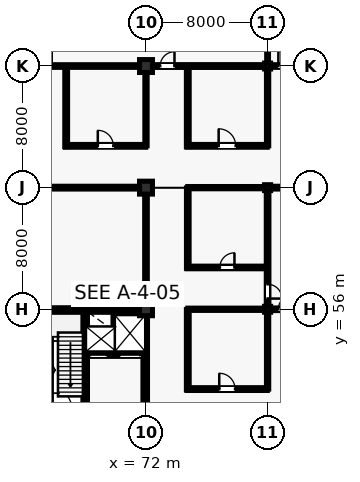
"""IFC4 building model, lengths in metres.
Left out: names, types, materials, properties, quantities, classifications, styles, units other than length and angle.
Written with IfcOpenShell. Run it as: python <this file> out.ifc"""

import sys

from ifc_helpers import new_model, si_unit, direction, frame, frame_2d, origin, origin_2d, place, context, subcontext, project, spatial, rectangle, i_section, extrude, element, fill, save


model = new_model("IFC4")
c1 = context("Model", 3, precision=1e-05, world=origin(), true_north=direction((0.0, 1.0)))
c2 = subcontext(c1, "Body", "Model", "MODEL_VIEW")
j1 = project(units=[si_unit("LENGTHUNIT", "METRE"), si_unit("PLANEANGLEUNIT", "RADIAN")], contexts=[c1])
p1 = place(None, origin())
s1 = spatial("IfcSite", under=j1, at=p1, CompositionType="ELEMENT")
p2 = place(p1, origin())
s2 = spatial("IfcBuilding", under=s1, at=p2, CompositionType="ELEMENT")
p3 = place(p2, origin())
s3 = spatial("IfcBuildingStorey", under=s2, at=p3, CompositionType="ELEMENT", Elevation=0.0)
for number, where, z_axis, x_axis in (
    (1, (72.0, 56.0, 0.0), (0.0, 0.0, 1.0), (1.0, 0.0, 0.0)),
    (2, (72.0, 64.0, 0.0), (0.0, 0.0, 1.0), (1.0, 0.0, 0.0)),
    (3, (72.0, 72.0, 0.0), (0.0, 0.0, 1.0), (1.0, 0.0, 0.0)),
):
    element("IfcColumn", number, at=place(p3, frame(where, z_axis=z_axis, x_axis=x_axis)), inside=s3, PredefinedType="COLUMN", context=c2, shape_type="SweptSolid", body=[
        extrude(rectangle(XDim=0.85, YDim=0.85, at=origin_2d()), origin(), (0.0, 0.0, 1.0), 5.28),
    ])
for number, where, z_axis, x_axis in (
    (4, (80.0, 56.0, 0.0), (0.0, 0.0, 1.0), (1.0, 0.0, 0.0)),
    (5, (80.0, 64.0, 0.0), (0.0, 0.0, 1.0), (1.0, 0.0, 0.0)),
    (6, (80.0, 72.0, 0.0), (0.0, 0.0, 1.0), (1.0, 0.0, 0.0)),
):
    element("IfcColumn", number, at=place(p3, frame(where, z_axis=z_axis, x_axis=x_axis)), inside=s3, PredefinedType="COLUMN", context=c2, shape_type="SweptSolid", body=[
        extrude(i_section(OverallWidth=0.398, OverallDepth=0.387, WebThickness=0.021, FlangeThickness=0.033, FilletRadius=0.015, at=origin_2d()), origin(), (0.0, 0.0, 1.0), 5.28),
    ])
p4 = place(p3, frame((64.29, 55.95, 0.0), z_axis=(0.0, 0.0, 1.0), x_axis=(1.0, 0.0, 0.0)))
e7 = element("IfcWall", 7, at=p4, inside=s3, PredefinedType="SHEAR", context=c2, shape_type="SweptSolid", body=[
    extrude(rectangle(XDim=7.395, YDim=0.3, at=frame_2d((3.698, 0.0))), origin(), (0.0, 0.0, 1.0), 5.035),
])
p5 = place(p3, frame((71.95, 48.315, 0.0), z_axis=(0.0, 0.0, 1.0), x_axis=(0.0, 1.0, 0.0)))
e8 = element("IfcWall", 8, at=p5, inside=s3, PredefinedType="SHEAR", context=c2, shape_type="SweptSolid", body=[
    extrude(rectangle(XDim=7.37, YDim=0.3, at=frame_2d((3.685, 0.0))), origin(), (0.0, 0.0, 1.0), 5.035),
])
p6 = place(p3, frame((68.0, 48.05, 0.0), z_axis=(0.0, 0.0, 1.0), x_axis=(0.0, 1.0, 0.0)))
e9 = element("IfcWall", 9, at=p6, inside=s3, PredefinedType="SHEAR", context=c2, shape_type="SweptSolid", body=[
    extrude(rectangle(XDim=7.9, YDim=0.3, at=frame_2d((3.95, 0.0))), origin(), (0.0, 0.0, 1.0), 5.035),
])
p7 = place(p6, frame((0.55, 0.0, 0.0)))
e10 = element("IfcOpeningElement", 10, at=p7, cuts=e9, PredefinedType="OPENING", context=c2, shape_type="SweptSolid", body=[
    extrude(rectangle(XDim=1.1, YDim=2.15, at=frame_2d((0.55, 1.075))), frame((0.0, 0.16, 0.0), z_axis=(0.0, -1.0, 0.0), x_axis=(1.0, 0.0, 0.0)), (0.0, 0.0, 1.0), 0.32),
])
p8 = place(p3, frame((68.0, 53.05, 0.0), z_axis=(0.0, 0.0, 1.0), x_axis=(1.0, 0.0, 0.0)))
e11 = element("IfcWall", 11, at=p8, inside=s3, PredefinedType="SHEAR", context=c2, shape_type="SweptSolid", body=[
    extrude(rectangle(XDim=3.95, YDim=0.3, at=frame_2d((1.975, 0.0))), origin(), (0.0, 0.0, 1.0), 5.035),
])
p9 = place(p8, frame((0.32, 0.0, 0.0)))
e12 = element("IfcOpeningElement", 12, at=p9, cuts=e11, PredefinedType="OPENING", context=c2, shape_type="SweptSolid", body=[
    extrude(rectangle(XDim=1.1, YDim=2.2, at=frame_2d((0.55, 1.1))), frame((0.0, 0.16, 0.0), z_axis=(0.0, -1.0, 0.0), x_axis=(1.0, 0.0, 0.0)), (0.0, 0.0, 1.0), 0.32),
])
p10 = place(p8, frame((2.28, 0.0, 0.0)))
e13 = element("IfcOpeningElement", 13, at=p10, cuts=e11, PredefinedType="OPENING", context=c2, shape_type="SweptSolid", body=[
    extrude(rectangle(XDim=1.35, YDim=2.3, at=frame_2d((0.675, 1.15))), frame((0.0, 0.16, 0.0), z_axis=(0.0, -1.0, 0.0), x_axis=(1.0, 0.0, 0.0)), (0.0, 0.0, 1.0), 0.32),
])
p11 = place(p3, frame((69.98, 53.05, 0.0), z_axis=(0.0, 0.0, 1.0), x_axis=(0.0, 1.0, 0.0)))
e14 = element("IfcWall", 14, at=p11, inside=s3, PredefinedType="SHEAR", context=c2, shape_type="SweptSolid", body=[
    extrude(rectangle(XDim=2.9, YDim=0.3, at=frame_2d((1.45, 0.0))), origin(), (0.0, 0.0, 1.0), 5.035),
])
p12 = place(p3, frame((66.7, 66.75, 0.0), z_axis=(0.0, 0.0, 1.0), x_axis=(1.0, 0.0, 0.0)))
e15 = element("IfcWall", 15, at=p12, inside=s3, PredefinedType="PARTITIONING", context=c2, shape_type="SweptSolid", body=[
    extrude(rectangle(XDim=5.28, YDim=0.185, at=frame_2d((2.64, 0.0))), origin(), (0.0, 0.0, 1.0), 4.412),
])
p13 = place(p12, frame((2.13, 0.0, 0.0)))
e16 = element("IfcOpeningElement", 16, at=p13, cuts=e15, PredefinedType="OPENING", context=c2, shape_type="SweptSolid", body=[
    extrude(rectangle(XDim=1.02, YDim=2.2, at=frame_2d((0.51, 1.1))), frame((0.0, 0.103, 0.0), z_axis=(0.0, -1.0, 0.0), x_axis=(1.0, 0.0, 0.0)), (0.0, 0.0, 1.0), 0.205),
])
p14 = place(p3, frame((66.75, 66.7, 0.0), z_axis=(0.0, 0.0, 1.0), x_axis=(0.0, 1.0, 0.0)))
e17 = element("IfcWall", 17, at=p14, inside=s3, PredefinedType="PARTITIONING", context=c2, shape_type="SweptSolid", body=[
    extrude(rectangle(XDim=5.28, YDim=0.185, at=frame_2d((2.64, 0.0))), origin(), (0.0, 0.0, 1.0), 4.403),
])
p15 = place(p3, frame((72.0, 66.75, 0.0), z_axis=(0.0, 0.0, 1.0), x_axis=(0.0, 1.0, 0.0)))
e18 = element("IfcWall", 18, at=p15, inside=s3, PredefinedType="PARTITIONING", context=c2, shape_type="SweptSolid", body=[
    extrude(rectangle(XDim=4.815, YDim=0.15, at=frame_2d((2.407, 0.0))), origin(), (0.0, 0.0, 1.0), 4.412),
])
p16 = place(p3, frame((74.7, 50.75, 0.0), z_axis=(0.0, 0.0, 1.0), x_axis=(1.0, 0.0, 0.0)))
e19 = element("IfcWall", 19, at=p16, inside=s3, PredefinedType="PARTITIONING", context=c2, shape_type="SweptSolid", body=[
    extrude(rectangle(XDim=5.28, YDim=0.185, at=frame_2d((2.64, 0.0))), origin(), (0.0, 0.0, 1.0), 4.403),
])
p17 = place(p16, frame((2.12, 0.0, 0.0)))
e20 = element("IfcOpeningElement", 20, at=p17, cuts=e19, PredefinedType="OPENING", context=c2, shape_type="SweptSolid", body=[
    extrude(rectangle(XDim=1.04, YDim=2.18, at=frame_2d((0.52, 1.09))), frame((0.0, 0.103, 0.0), z_axis=(0.0, -1.0, 0.0), x_axis=(1.0, 0.0, 0.0)), (0.0, 0.0, 1.0), 0.205),
])
p18 = place(p3, frame((74.75, 50.7, 0.0), z_axis=(0.0, 0.0, 1.0), x_axis=(0.0, 1.0, 0.0)))
e21 = element("IfcWall", 21, at=p18, inside=s3, PredefinedType="PARTITIONING", context=c2, shape_type="SweptSolid", body=[
    extrude(rectangle(XDim=5.28, YDim=0.185, at=frame_2d((2.64, 0.0))), origin(), (0.0, 0.0, 1.0), 4.327),
])
p19 = place(p3, frame((74.75, 56.0, 0.0), z_axis=(0.0, 0.0, 1.0), x_axis=(1.0, 0.0, 0.0)))
e22 = element("IfcWall", 22, at=p19, inside=s3, PredefinedType="PARTITIONING", context=c2, shape_type="SweptSolid", body=[
    extrude(rectangle(XDim=5.041, YDim=0.15, at=frame_2d((2.521, 0.0))), origin(), (0.0, 0.0, 1.0), 4.327),
])
p20 = place(p3, frame((80.0, 50.75, 0.0), z_axis=(0.0, 0.0, 1.0), x_axis=(0.0, 1.0, 0.0)))
e23 = element("IfcWall", 23, at=p20, inside=s3, PredefinedType="PARTITIONING", context=c2, shape_type="SweptSolid", body=[
    extrude(rectangle(XDim=5.046, YDim=0.15, at=frame_2d((2.523, 0.0))), origin(), (0.0, 0.0, 1.0), 4.403),
])
p21 = place(p3, frame((74.7, 58.75, 0.0), z_axis=(0.0, 0.0, 1.0), x_axis=(1.0, 0.0, 0.0)))
e24 = element("IfcWall", 24, at=p21, inside=s3, PredefinedType="PARTITIONING", context=c2, shape_type="SweptSolid", body=[
    extrude(rectangle(XDim=5.28, YDim=0.175, at=frame_2d((2.64, 0.0))), origin(), (0.0, 0.0, 1.0), 4.412),
])
p22 = place(p21, frame((2.16, 0.0, 0.0)))
e25 = element("IfcOpeningElement", 25, at=p22, cuts=e24, PredefinedType="OPENING", context=c2, shape_type="SweptSolid", body=[
    extrude(rectangle(XDim=0.96, YDim=2.14, at=frame_2d((0.48, 1.07))), frame((0.0, 0.097, 0.0), z_axis=(0.0, -1.0, 0.0), x_axis=(1.0, 0.0, 0.0)), (0.0, 0.0, 1.0), 0.195),
])
p23 = place(p3, frame((74.75, 58.7, 0.0), z_axis=(0.0, 0.0, 1.0), x_axis=(0.0, 1.0, 0.0)))
e26 = element("IfcWall", 26, at=p23, inside=s3, PredefinedType="PARTITIONING", context=c2, shape_type="SweptSolid", body=[
    extrude(rectangle(XDim=5.28, YDim=0.175, at=frame_2d((2.64, 0.0))), origin(), (0.0, 0.0, 1.0), 4.403),
])
p24 = place(p3, frame((74.75, 64.0, 0.0), z_axis=(0.0, 0.0, 1.0), x_axis=(1.0, 0.0, 0.0)))
e27 = element("IfcWall", 27, at=p24, inside=s3, PredefinedType="PARTITIONING", context=c2, shape_type="SweptSolid", body=[
    extrude(rectangle(XDim=5.041, YDim=0.15, at=frame_2d((2.521, 0.0))), origin(), (0.0, 0.0, 1.0), 4.403),
])
p25 = place(p3, frame((74.7, 66.75, 0.0), z_axis=(0.0, 0.0, 1.0), x_axis=(1.0, 0.0, 0.0)))
e28 = element("IfcWall", 28, at=p25, inside=s3, PredefinedType="PARTITIONING", context=c2, shape_type="SweptSolid", body=[
    extrude(rectangle(XDim=5.28, YDim=0.185, at=frame_2d((2.64, 0.0))), origin(), (0.0, 0.0, 1.0), 4.404),
])
p26 = place(p25, frame((2.08, 0.0, 0.0)))
e29 = element("IfcOpeningElement", 29, at=p26, cuts=e28, PredefinedType="OPENING", context=c2, shape_type="SweptSolid", body=[
    extrude(rectangle(XDim=1.12, YDim=2.22, at=frame_2d((0.56, 1.11))), frame((0.0, 0.103, 0.0), z_axis=(0.0, -1.0, 0.0), x_axis=(1.0, 0.0, 0.0)), (0.0, 0.0, 1.0), 0.205),
])
p27 = place(p3, frame((74.75, 66.7, 0.0), z_axis=(0.0, 0.0, 1.0), x_axis=(0.0, 1.0, 0.0)))
e30 = element("IfcWall", 30, at=p27, inside=s3, PredefinedType="PARTITIONING", context=c2, shape_type="SweptSolid", body=[
    extrude(rectangle(XDim=5.28, YDim=0.185, at=frame_2d((2.64, 0.0))), origin(), (0.0, 0.0, 1.0), 4.336),
])
p28 = place(p3, frame((80.0, 66.75, 0.0), z_axis=(0.0, 0.0, 1.0), x_axis=(0.0, 1.0, 0.0)))
e31 = element("IfcWall", 31, at=p28, inside=s3, PredefinedType="PARTITIONING", context=c2, shape_type="SweptSolid", body=[
    extrude(rectangle(XDim=5.046, YDim=0.15, at=frame_2d((2.523, 0.0))), origin(), (0.0, 0.0, 1.0), 4.404),
])
p29 = place(p3, frame((72.0, 56.415, 0.0), z_axis=(0.0, 0.0, 1.0), x_axis=(0.0, 1.0, 0.0)))
e32 = element("IfcWall", 32, at=p29, inside=s3, PredefinedType="PARTITIONING", context=c2, shape_type="SweptSolid", body=[
    extrude(rectangle(XDim=7.17, YDim=0.175, at=frame_2d((3.585, 0.0))), origin(), (0.0, 0.0, 1.0), 4.403),
])
p30 = place(p3, frame((64.34, 64.0, 0.0), z_axis=(0.0, 0.0, 1.0), x_axis=(1.0, 0.0, 0.0)))
e33 = element("IfcWall", 33, at=p30, inside=s3, PredefinedType="PARTITIONING", context=c2, shape_type="SweptSolid", body=[
    extrude(rectangle(XDim=7.245, YDim=0.185, at=frame_2d((3.623, 0.0))), origin(), (0.0, 0.0, 1.0), 4.327),
])
p31 = place(p3, frame((64.34, 72.0, 0.0), z_axis=(0.0, 0.0, 1.0), x_axis=(1.0, 0.0, 0.0)))
e34 = element("IfcWall", 34, at=p31, inside=s3, PredefinedType="PARTITIONING", context=c2, shape_type="SweptSolid", body=[
    extrude(rectangle(XDim=7.245, YDim=0.175, at=frame_2d((3.623, 0.0))), origin(), (0.0, 0.0, 1.0), 4.403),
])
p32 = place(p31, frame((0.52, 0.0, 0.0)))
e35 = element("IfcOpeningElement", 35, at=p32, cuts=e34, PredefinedType="OPENING", context=c2, shape_type="SweptSolid", body=[
    extrude(rectangle(XDim=0.94, YDim=2.12, at=frame_2d((0.47, 1.06))), frame((0.0, 0.097, 0.0), z_axis=(0.0, -1.0, 0.0), x_axis=(1.0, 0.0, 0.0)), (0.0, 0.0, 1.0), 0.195),
])
p33 = place(p3, frame((80.0, 56.184, 0.0), z_axis=(0.0, 0.0, 1.0), x_axis=(0.0, 1.0, 0.0)))
e36 = element("IfcWall", 36, at=p33, inside=s3, PredefinedType="PARTITIONING", context=c2, shape_type="SweptSolid", body=[
    extrude(rectangle(XDim=7.633, YDim=0.175, at=frame_2d((3.816, 0.0))), origin(), (0.0, 0.0, 1.0), 4.412),
])
p34 = place(p33, frame((0.52, 0.0, 0.0)))
e37 = element("IfcOpeningElement", 37, at=p34, cuts=e36, PredefinedType="OPENING", context=c2, shape_type="SweptSolid", body=[
    extrude(rectangle(XDim=0.94, YDim=2.12, at=frame_2d((0.47, 1.06))), frame((0.0, 0.097, 0.0), z_axis=(0.0, -1.0, 0.0), x_axis=(1.0, 0.0, 0.0)), (0.0, 0.0, 1.0), 0.195),
])
p35 = place(p3, frame((72.415, 72.0, 0.0), z_axis=(0.0, 0.0, 1.0), x_axis=(1.0, 0.0, 0.0)))
e38 = element("IfcWall", 38, at=p35, inside=s3, PredefinedType="PARTITIONING", context=c2, shape_type="SweptSolid", body=[
    extrude(rectangle(XDim=7.396, YDim=0.185, at=frame_2d((3.698, 0.0))), origin(), (0.0, 0.0, 1.0), 4.336),
])
p36 = place(p35, frame((0.52, 0.0, 0.0)))
e39 = element("IfcOpeningElement", 39, at=p36, cuts=e38, PredefinedType="OPENING", context=c2, shape_type="SweptSolid", body=[
    extrude(rectangle(XDim=0.94, YDim=2.12, at=frame_2d((0.47, 1.06))), frame((0.0, 0.103, 0.0), z_axis=(0.0, -1.0, 0.0), x_axis=(1.0, 0.0, 0.0)), (0.0, 0.0, 1.0), 0.205),
])
p37 = place(p3, frame((80.0, 72.184, 0.0), z_axis=(0.0, 0.0, 1.0), x_axis=(0.0, 1.0, 0.0)))
e40 = element("IfcWall", 40, at=p37, inside=s3, PredefinedType="PARTITIONING", context=c2, shape_type="SweptSolid", body=[
    extrude(rectangle(XDim=7.633, YDim=0.12, at=frame_2d((3.816, 0.0))), origin(), (0.0, 0.0, 1.0), 4.471),
])
p38 = place(p3, frame((80.189, 56.0, 0.0), z_axis=(0.0, 0.0, 1.0), x_axis=(1.0, 0.0, 0.0)))
e41 = element("IfcWall", 41, at=p38, inside=s3, PredefinedType="PARTITIONING", context=c2, shape_type="SweptSolid", body=[
    extrude(rectangle(XDim=7.811, YDim=0.175, at=frame_2d((3.906, 0.0))), origin(), (0.0, 0.0, 1.0), 4.169),
])
p39 = place(p38, frame((0.52, 0.0, 0.0)))
e42 = element("IfcOpeningElement", 42, at=p39, cuts=e41, PredefinedType="OPENING", context=c2, shape_type="SweptSolid", body=[
    extrude(rectangle(XDim=0.94, YDim=2.12, at=frame_2d((0.47, 1.06))), frame((0.0, 0.097, 0.0), z_axis=(0.0, -1.0, 0.0), x_axis=(1.0, 0.0, 0.0)), (0.0, 0.0, 1.0), 0.195),
])
p40 = place(p3, frame((80.189, 64.0, 0.0), z_axis=(0.0, 0.0, 1.0), x_axis=(1.0, 0.0, 0.0)))
e43 = element("IfcWall", 43, at=p40, inside=s3, PredefinedType="PARTITIONING", context=c2, shape_type="SweptSolid", body=[
    extrude(rectangle(XDim=7.811, YDim=0.185, at=frame_2d((3.906, 0.0))), origin(), (0.0, 0.0, 1.0), 4.25),
])
p41 = place(p40, frame((3.256, 0.0, 0.0)))
e44 = element("IfcOpeningElement", 44, at=p41, cuts=e43, PredefinedType="OPENING", context=c2, shape_type="SweptSolid", body=[
    extrude(rectangle(XDim=1.3, YDim=2.2, at=frame_2d((0.65, 1.1))), frame((0.0, 0.103, 0.0), z_axis=(0.0, -1.0, 0.0), x_axis=(1.0, 0.0, 0.0)), (0.0, 0.0, 1.0), 0.205),
])
p42 = place(p3, frame((80.189, 72.0, 0.0), z_axis=(0.0, 0.0, 1.0), x_axis=(1.0, 0.0, 0.0)))
e45 = element("IfcWall", 45, at=p42, inside=s3, PredefinedType="PARTITIONING", context=c2, shape_type="SweptSolid", body=[
    extrude(rectangle(XDim=7.811, YDim=0.175, at=frame_2d((3.906, 0.0))), origin(), (0.0, 0.0, 1.0), 4.262),
])
p43 = place(p42, frame((0.52, 0.0, 0.0)))
e46 = element("IfcOpeningElement", 46, at=p43, cuts=e45, PredefinedType="OPENING", context=c2, shape_type="SweptSolid", body=[
    extrude(rectangle(XDim=0.94, YDim=2.12, at=frame_2d((0.47, 1.06))), frame((0.0, 0.097, 0.0), z_axis=(0.0, -1.0, 0.0), x_axis=(1.0, 0.0, 0.0)), (0.0, 0.0, 1.0), 0.195),
])
p44 = place(p9, origin())
e47 = element("IfcDoor", 47, at=p44, inside=s3, OperationType="SLIDING_TO_LEFT", PredefinedType="DOOR", context=c2, shape_type="SweptSolid", body=[
    extrude(rectangle(XDim=1.1, YDim=2.2, at=frame_2d((0.55, 1.1))), frame((0.0, 0.025, 0.0), z_axis=(0.0, -1.0, 0.0), x_axis=(1.0, 0.0, 0.0)), (0.0, 0.0, 1.0), 0.05),
])
fill(e12, e47)
p45 = place(p10, origin())
e48 = element("IfcDoor", 48, at=p45, inside=s3, OperationType="DOUBLE_DOOR_SLIDING", PredefinedType="DOOR", context=c2, shape_type="SweptSolid", body=[
    extrude(rectangle(XDim=1.35, YDim=2.3, at=frame_2d((0.675, 1.15))), frame((0.0, 0.025, 0.0), z_axis=(0.0, -1.0, 0.0), x_axis=(1.0, 0.0, 0.0)), (0.0, 0.0, 1.0), 0.05),
])
fill(e13, e48)
p46 = place(p13, origin())
e49 = element("IfcDoor", 49, at=p46, inside=s3, OperationType="SINGLE_SWING_LEFT", PredefinedType="DOOR", context=c2, shape_type="SweptSolid", body=[
    extrude(rectangle(XDim=1.02, YDim=2.2, at=frame_2d((0.51, 1.1))), frame((0.0, 0.025, 0.0), z_axis=(0.0, -1.0, 0.0), x_axis=(1.0, 0.0, 0.0)), (0.0, 0.0, 1.0), 0.05),
])
fill(e16, e49)
p47 = place(p17, origin())
e50 = element("IfcDoor", 50, at=p47, inside=s3, OperationType="SINGLE_SWING_LEFT", PredefinedType="DOOR", context=c2, shape_type="SweptSolid", body=[
    extrude(rectangle(XDim=1.04, YDim=2.18, at=frame_2d((0.52, 1.09))), frame((0.0, 0.025, 0.0), z_axis=(0.0, -1.0, 0.0), x_axis=(1.0, 0.0, 0.0)), (0.0, 0.0, 1.0), 0.05),
])
fill(e20, e50)
p48 = place(p22, origin())
e51 = element("IfcDoor", 51, at=p48, inside=s3, OperationType="SINGLE_SWING_RIGHT", PredefinedType="DOOR", context=c2, shape_type="SweptSolid", body=[
    extrude(rectangle(XDim=0.96, YDim=2.14, at=frame_2d((0.48, 1.07))), frame((0.0, 0.025, 0.0), z_axis=(0.0, -1.0, 0.0), x_axis=(1.0, 0.0, 0.0)), (0.0, 0.0, 1.0), 0.05),
])
fill(e25, e51)
p49 = place(p26, origin())
e52 = element("IfcDoor", 52, at=p49, inside=s3, OperationType="SINGLE_SWING_LEFT", PredefinedType="DOOR", context=c2, shape_type="SweptSolid", body=[
    extrude(rectangle(XDim=1.12, YDim=2.22, at=frame_2d((0.56, 1.11))), frame((0.0, 0.025, 0.0), z_axis=(0.0, -1.0, 0.0), x_axis=(1.0, 0.0, 0.0)), (0.0, 0.0, 1.0), 0.05),
])
fill(e29, e52)
p50 = place(p34, frame((0.94, 0.0, 0.0), z_axis=(0.0, 0.0, 1.0), x_axis=(-1.0, 0.0, 0.0)))
e53 = element("IfcDoor", 53, at=p50, inside=s3, OperationType="SINGLE_SWING_LEFT", PredefinedType="DOOR", context=c2, shape_type="SweptSolid", body=[
    extrude(rectangle(XDim=0.94, YDim=2.12, at=frame_2d((0.47, 1.06))), frame((0.0, 0.025, 0.0), z_axis=(0.0, -1.0, 0.0), x_axis=(1.0, 0.0, 0.0)), (0.0, 0.0, 1.0), 0.05),
])
fill(e37, e53)
p51 = place(p36, origin())
e54 = element("IfcDoor", 54, at=p51, inside=s3, OperationType="SINGLE_SWING_RIGHT", PredefinedType="DOOR", context=c2, shape_type="SweptSolid", body=[
    extrude(rectangle(XDim=0.94, YDim=2.12, at=frame_2d((0.47, 1.06))), frame((0.0, 0.025, 0.0), z_axis=(0.0, -1.0, 0.0), x_axis=(1.0, 0.0, 0.0)), (0.0, 0.0, 1.0), 0.05),
])
fill(e39, e54)
p52 = place(p39, origin())
e55 = element("IfcDoor", 55, at=p52, inside=s3, OperationType="SINGLE_SWING_RIGHT", PredefinedType="DOOR", context=c2, shape_type="SweptSolid", body=[
    extrude(rectangle(XDim=0.94, YDim=2.12, at=frame_2d((0.47, 1.06))), frame((0.0, 0.025, 0.0), z_axis=(0.0, -1.0, 0.0), x_axis=(1.0, 0.0, 0.0)), (0.0, 0.0, 1.0), 0.05),
])
fill(e42, e55)
p53 = place(p43, origin())
e56 = element("IfcDoor", 56, at=p53, inside=s3, OperationType="SINGLE_SWING_LEFT", PredefinedType="DOOR", context=c2, shape_type="SweptSolid", body=[
    extrude(rectangle(XDim=0.94, YDim=2.12, at=frame_2d((0.47, 1.06))), frame((0.0, 0.025, 0.0), z_axis=(0.0, -1.0, 0.0), x_axis=(1.0, 0.0, 0.0)), (0.0, 0.0, 1.0), 0.05),
])
fill(e46, e56)
save(model, sys.argv[1])
